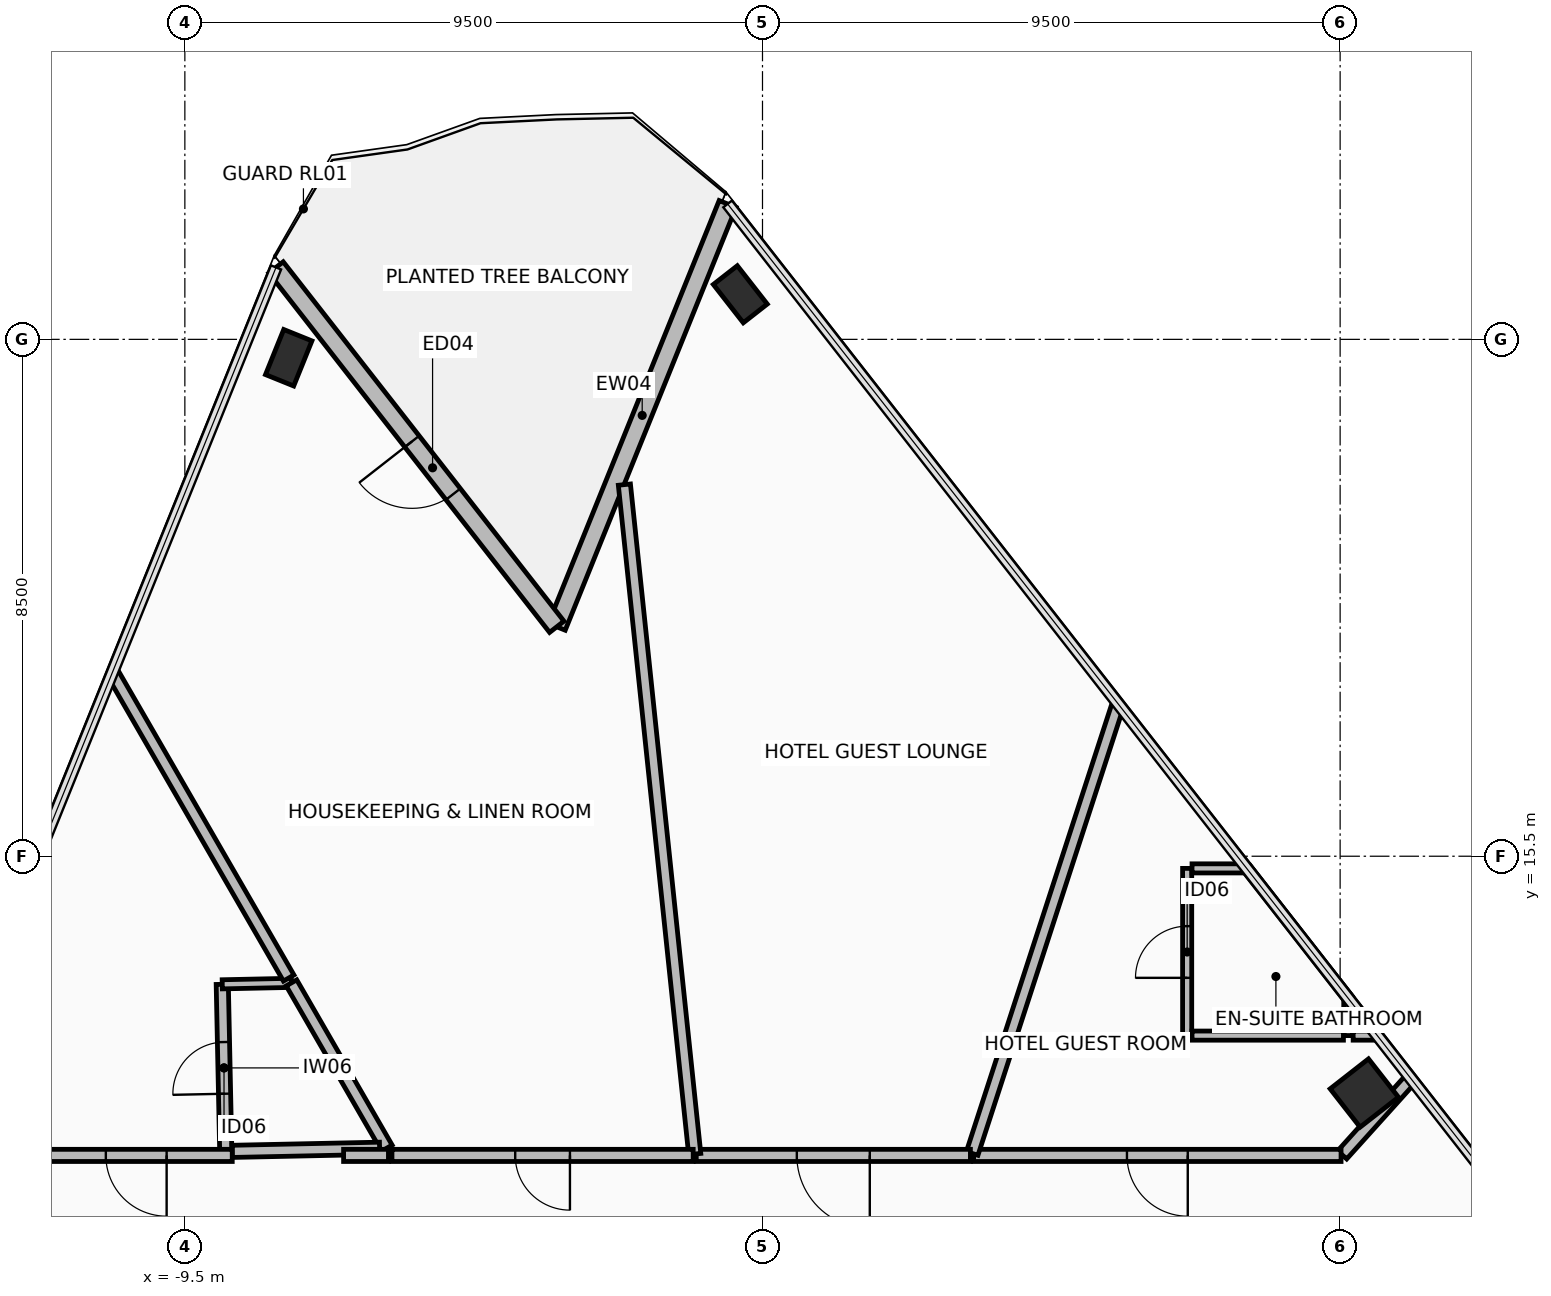
"""IFC4 building model, lengths in metres.
Left out: names, types, materials, properties, quantities, classifications, styles, units other than length and angle.
Written with IfcOpenShell. Run it as: python <this file> out.ifc"""

import sys

from ifc_helpers import new_model, si_unit, direction, frame, frame_2d, origin, origin_2d, place, context, subcontext, project, spatial, rectangle, hollow_rectangle, extrude, element, fill, save


model = new_model("IFC4")
c1 = context("Model", 3, precision=1e-05, world=origin(), true_north=direction((0.0, 1.0)))
c2 = subcontext(c1, "Body", "Model", "MODEL_VIEW")
j1 = project(units=[si_unit("LENGTHUNIT", "METRE"), si_unit("PLANEANGLEUNIT", "RADIAN")], contexts=[c1])
p1 = place(None, origin())
s1 = spatial("IfcSite", under=j1, at=p1, CompositionType="ELEMENT")
p2 = place(p1, origin())
s2 = spatial("IfcBuilding", under=s1, at=p2, CompositionType="ELEMENT")
p3 = place(p2, frame((0.0, 0.0, 63.85)))
s3 = spatial("IfcBuildingStorey", under=s2, at=p3, CompositionType="ELEMENT", Elevation=63.85)
p4 = place(p3, frame((-7.792, 23.698, 0.0), z_axis=(0.0, 0.0, 1.0), x_axis=(0.374608211656, 0.927183200754, 0.0)))
e1 = element("IfcColumn", 1, at=p4, inside=s3, PredefinedType="COLUMN", context=c2, shape_type="SweptSolid", body=[
    extrude(hollow_rectangle(XDim=0.5, YDim=0.8, WallThickness=0.04, at=origin_2d()), origin(), (0.0, 0.0, 1.0), 3.45),
])
p5 = place(p3, frame((9.898, 11.606, 0.0), z_axis=(0.0, 0.0, 1.0), x_axis=(-0.615661475326, 0.788010753607, 0.0)))
e2 = element("IfcColumn", 2, at=p5, inside=s3, PredefinedType="COLUMN", context=c2, shape_type="SweptSolid", body=[
    extrude(hollow_rectangle(XDim=0.8, YDim=0.8, WallThickness=0.045, at=origin_2d()), origin(), (0.0, 0.0, 1.0), 3.45),
])
p6 = place(p3, frame((-0.365, 24.741, 0.0), z_axis=(0.0, 0.0, 1.0), x_axis=(-0.615661475326, 0.788010753607, 0.0)))
e3 = element("IfcColumn", 3, at=p6, inside=s3, PredefinedType="COLUMN", context=c2, shape_type="SweptSolid", body=[
    extrude(hollow_rectangle(XDim=0.5, YDim=0.8, WallThickness=0.04, at=origin_2d()), origin(), (0.0, 0.0, 1.0), 3.45),
])
p7 = place(p3, frame((-0.574, 26.227, 0.0), z_axis=(0.0, 0.0, 1.0), x_axis=(-0.374609979755, -0.92718248639, 0.0)))
e4 = element("IfcWall", 4, at=p7, inside=s3, PredefinedType="STANDARD", context=c2, shape_type="SweptSolid", body=[
    extrude(rectangle(XDim=7.5, YDim=0.3, at=frame_2d((3.75, 0.0))), origin(), (0.0, 0.0, 1.0), 2.47),
])
p8 = place(p3, frame((-3.383, 19.273, 0.0), z_axis=(0.0, 0.0, 1.0), x_axis=(-0.615654149001, 0.788016477504, 0.0)))
e5 = element("IfcWall", 5, at=p8, inside=s3, PredefinedType="STANDARD", context=c2, shape_type="SweptSolid", body=[
    extrude(rectangle(XDim=7.5, YDim=0.3, at=frame_2d((3.75, 0.0))), origin(), (0.0, 0.0, 1.0), 2.47),
])
p9 = place(p8, frame((2.768, 0.0, 0.0)))
e6 = element("IfcOpeningElement", 6, at=p9, cuts=e5, PredefinedType="OPENING", context=c2, shape_type="SweptSolid", body=[
    extrude(rectangle(XDim=1.1, YDim=2.2, at=frame_2d((0.55, 1.1))), frame((0.0, 0.16, 0.0), z_axis=(0.0, -1.0, 0.0), x_axis=(1.0, 0.0, 0.0)), (0.0, 0.0, 1.0), 0.32),
])
p10 = place(p3, frame((6.984, 12.55, 0.0), z_axis=(0.0, 0.0, 1.0), x_axis=(0.0, 1.0, 0.0)))
e7 = element("IfcWall", 7, at=p10, inside=s3, PredefinedType="PARTITIONING", context=c2, shape_type="SweptSolid", body=[
    extrude(rectangle(XDim=2.75, YDim=0.15, at=frame_2d((1.375, 0.0))), origin(), (0.0, 0.0, 1.0), 2.47),
])
p11 = place(p10, frame((0.95, 0.0, 0.0)))
e8 = element("IfcOpeningElement", 8, at=p11, cuts=e7, PredefinedType="OPENING", context=c2, shape_type="SweptSolid", body=[
    extrude(rectangle(XDim=0.85, YDim=2.1, at=frame_2d((0.425, 1.05))), frame((0.0, 0.085, 0.0), z_axis=(0.0, -1.0, 0.0), x_axis=(1.0, 0.0, 0.0)), (0.0, 0.0, 1.0), 0.17),
])
p12 = place(p3, frame((7.064, 15.3, 0.0), z_axis=(0.0, 0.0, 1.0), x_axis=(1.0, 0.0, 0.0)))
e9 = element("IfcWall", 9, at=p12, inside=s3, PredefinedType="PARTITIONING", context=c2, shape_type="SweptSolid", body=[
    extrude(rectangle(XDim=0.899, YDim=0.15, at=frame_2d((0.45, 0.0))), origin(), (0.0, 0.0, 1.0), 2.47),
])
p13 = place(p3, frame((7.963, 15.3, 0.0), z_axis=(0.0, 0.0, 1.0), x_axis=(0.615614367474, -0.788047556026, 0.0)))
e10 = element("IfcWall", 10, at=p13, inside=s3, PredefinedType="PARTITIONING", context=c2, shape_type="SweptSolid", body=[
    extrude(rectangle(XDim=2.714, YDim=0.15, at=frame_2d((1.357, 0.0))), origin(), (0.0, 0.0, 1.0), 3.275),
])
p14 = place(p3, frame((9.634, 13.161, 0.0), z_axis=(0.0, 0.0, 1.0), x_axis=(0.0, -1.0, 0.0)))
e11 = element("IfcWall", 11, at=p14, inside=s3, PredefinedType="PARTITIONING", context=c2, shape_type="SweptSolid", body=[
    extrude(rectangle(XDim=0.611, YDim=0.15, at=frame_2d((0.306, 0.0))), origin(), (0.0, 0.0, 1.0), 3.275),
])
p15 = place(p3, frame((10.112, 12.55, 0.0), z_axis=(0.0, 0.0, 1.0), x_axis=(-1.0, 0.0, 0.0)))
e12 = element("IfcWall", 12, at=p15, inside=s3, PredefinedType="PARTITIONING", context=c2, shape_type="SweptSolid", body=[
    extrude(rectangle(XDim=0.397, YDim=0.15, at=frame_2d((0.199, 0.0))), origin(), (0.0, 0.0, 1.0), 3.275),
])
p16 = place(p3, frame((9.554, 12.55, 0.0), z_axis=(0.0, 0.0, 1.0), x_axis=(-1.0, 0.0, 0.0)))
e13 = element("IfcWall", 13, at=p16, inside=s3, PredefinedType="PARTITIONING", context=c2, shape_type="SweptSolid", body=[
    extrude(rectangle(XDim=2.49, YDim=0.15, at=frame_2d((1.245, 0.0))), origin(), (0.0, 0.0, 1.0), 2.47),
])
p17 = place(p3, frame((-8.827, 10.644, 0.0), z_axis=(0.0, 0.0, 1.0), x_axis=(-0.021041428763, 0.99977860463, 0.0)))
e14 = element("IfcWall", 14, at=p17, inside=s3, PredefinedType="PARTITIONING", context=c2, shape_type="SweptSolid", body=[
    extrude(rectangle(XDim=2.75, YDim=0.2, at=frame_2d((1.375, 0.0))), origin(), (0.0, 0.0, 1.0), 2.67),
])
p18 = place(p17, frame((0.95, 0.0, 0.0)))
e15 = element("IfcOpeningElement", 15, at=p18, cuts=e14, PredefinedType="OPENING", context=c2, shape_type="SweptSolid", body=[
    extrude(rectangle(XDim=0.85, YDim=2.1, at=frame_2d((0.425, 1.05))), frame((0.0, 0.11, 0.0), z_axis=(0.0, -1.0, 0.0), x_axis=(1.0, 0.0, 0.0)), (0.0, 0.0, 1.0), 0.22),
])
p19 = place(p3, frame((-8.885, 13.394, 0.0), z_axis=(0.0, 0.0, 1.0), x_axis=(0.999779226224, 0.02101187308, 0.0)))
e16 = element("IfcWall", 16, at=p19, inside=s3, PredefinedType="PARTITIONING", context=c2, shape_type="SweptSolid", body=[
    extrude(rectangle(XDim=1.139, YDim=0.15, at=frame_2d((0.569, 0.0))), origin(), (0.0, 0.0, 1.0), 2.67),
])
p20 = place(p3, frame((-7.747, 13.417, 0.0), z_axis=(0.0, 0.0, 1.0), x_axis=(0.50003000113, -0.866008081931, 0.0)))
e17 = element("IfcWall", 17, at=p20, inside=s3, PredefinedType="PARTITIONING", context=c2, shape_type="SweptSolid", body=[
    extrude(rectangle(XDim=3.138, YDim=0.2, at=frame_2d((1.569, 0.0))), origin(), (0.0, 0.0, 1.0), 2.62),
])
p21 = place(p3, frame((-6.297, 10.698, 0.0), z_axis=(0.0, 0.0, 1.0), x_axis=(-0.999778667622, -0.021038435515, 0.0)))
e18 = element("IfcWall", 18, at=p21, inside=s3, PredefinedType="PARTITIONING", context=c2, shape_type="SweptSolid", body=[
    extrude(rectangle(XDim=2.425, YDim=0.2, at=frame_2d((1.213, 0.0))), origin(), (0.0, 0.0, 1.0), 2.62),
])
p22 = place(p3, frame((10.65, 11.828, 0.0), z_axis=(0.0, 0.0, 1.0), x_axis=(-0.669183038029, -0.74309761244, 0.0)))
e19 = element("IfcWall", 19, at=p22, inside=s3, PredefinedType="PARTITIONING", context=c2, shape_type="SweptSolid", body=[
    extrude(rectangle(XDim=1.668, YDim=0.2, at=frame_2d((0.834, 0.0))), origin(), (0.0, 0.0, 1.0), 2.47),
])
p23 = place(p3, frame((9.515, 10.58, 0.0), z_axis=(0.0, 0.0, 1.0), x_axis=(-1.0, 0.0, 0.0)))
e20 = element("IfcWall", 20, at=p23, inside=s3, PredefinedType="PARTITIONING", context=c2, shape_type="SweptSolid", body=[
    extrude(rectangle(XDim=6.043, YDim=0.2, at=frame_2d((3.021, 0.0))), origin(), (0.0, 0.0, 1.0), 2.67),
])
p24 = place(p23, frame((2.521, 0.0, 0.0)))
e21 = element("IfcOpeningElement", 21, at=p24, cuts=e20, PredefinedType="OPENING", context=c2, shape_type="SweptSolid", body=[
    extrude(rectangle(XDim=1.0, YDim=2.15, at=frame_2d((0.5, 1.075))), frame((0.0, 0.11, 0.0), z_axis=(0.0, -1.0, 0.0), x_axis=(1.0, 0.0, 0.0)), (0.0, 0.0, 1.0), 0.22),
])
p25 = place(p3, frame((3.448, 10.613, 0.0), z_axis=(0.0, 0.0, 1.0), x_axis=(0.30901930812, 0.951055764511, 0.0)))
e22 = element("IfcWall", 22, at=p25, inside=s3, PredefinedType="PARTITIONING", context=c2, shape_type="SweptSolid", body=[
    extrude(rectangle(XDim=7.772, YDim=0.2, at=frame_2d((3.886, 0.0))), origin(), (0.0, 0.0, 1.0), 2.47),
])
p26 = place(p3, frame((3.419, 10.58, 0.0), z_axis=(0.0, 0.0, 1.0), x_axis=(-1.0, 0.0, 0.0)))
e23 = element("IfcWall", 23, at=p26, inside=s3, PredefinedType="PARTITIONING", context=c2, shape_type="SweptSolid", body=[
    extrude(rectangle(XDim=4.509, YDim=0.2, at=frame_2d((2.254, 0.0))), origin(), (0.0, 0.0, 1.0), 2.67),
])
p27 = place(p26, frame((1.655, 0.0, 0.0)))
e24 = element("IfcOpeningElement", 24, at=p27, cuts=e23, PredefinedType="OPENING", context=c2, shape_type="SweptSolid", body=[
    extrude(rectangle(XDim=1.2, YDim=2.15, at=frame_2d((0.6, 1.075))), frame((0.0, 0.11, 0.0), z_axis=(0.0, -1.0, 0.0), x_axis=(1.0, 0.0, 0.0)), (0.0, 0.0, 1.0), 0.22),
])
p28 = place(p3, frame((-1.115, 10.602, 0.0), z_axis=(0.0, 0.0, 1.0), x_axis=(-0.104520606216, 0.994522721146, 0.0)))
e25 = element("IfcWall", 25, at=p28, inside=s3, PredefinedType="PARTITIONING", context=c2, shape_type="SweptSolid", body=[
    extrude(rectangle(XDim=11.069, YDim=0.2, at=frame_2d((5.535, 0.0))), origin(), (0.0, 0.0, 1.0), 3.275),
])
p29 = place(p3, frame((-1.14, 10.58, 0.0), z_axis=(0.0, 0.0, 1.0), x_axis=(-1.0, 0.0, 0.0)))
e26 = element("IfcWall", 26, at=p29, inside=s3, PredefinedType="PARTITIONING", context=c2, shape_type="SweptSolid", body=[
    extrude(rectangle(XDim=4.954, YDim=0.2, at=frame_2d((2.477, 0.0))), origin(), (0.0, 0.0, 1.0), 3.275),
])
p30 = place(p29, frame((2.027, 0.0, 0.0)))
e27 = element("IfcOpeningElement", 27, at=p30, cuts=e26, PredefinedType="OPENING", context=c2, shape_type="SweptSolid", body=[
    extrude(rectangle(XDim=0.9, YDim=2.1, at=frame_2d((0.45, 1.05))), frame((0.0, 0.11, 0.0), z_axis=(0.0, -1.0, 0.0), x_axis=(1.0, 0.0, 0.0)), (0.0, 0.0, 1.0), 0.22),
])
p31 = place(p3, frame((-7.792, 13.497, 0.0), z_axis=(0.0, 0.0, 1.0), x_axis=(-0.499990180648, 0.866031072916, 0.0)))
e28 = element("IfcWall", 28, at=p31, inside=s3, PredefinedType="PARTITIONING", context=c2, shape_type="SweptSolid", body=[
    extrude(rectangle(XDim=5.789, YDim=0.2, at=frame_2d((2.894, 0.0))), origin(), (0.0, 0.0, 1.0), 2.47),
])
p32 = place(p3, frame((-6.152, 10.58, 0.0), z_axis=(0.0, 0.0, 1.0), x_axis=(-1.0, 0.0, 0.0)))
e29 = element("IfcWall", 29, at=p32, inside=s3, PredefinedType="PARTITIONING", context=c2, shape_type="SweptSolid", body=[
    extrude(rectangle(XDim=0.738, YDim=0.2, at=frame_2d((0.369, 0.0))), origin(), (0.0, 0.0, 1.0), 3.275),
])
p33 = place(p3, frame((-8.721, 10.58, 0.0), z_axis=(0.0, 0.0, 1.0), x_axis=(-1.0, 0.0, 0.0)))
e30 = element("IfcWall", 30, at=p33, inside=s3, PredefinedType="PARTITIONING", context=c2, shape_type="SweptSolid", body=[
    extrude(rectangle(XDim=3.159, YDim=0.2, at=frame_2d((1.579, 0.0))), origin(), (0.0, 0.0, 1.0), 2.67),
])
p34 = place(p33, frame((1.079, 0.0, 0.0)))
e31 = element("IfcOpeningElement", 31, at=p34, cuts=e30, PredefinedType="OPENING", context=c2, shape_type="SweptSolid", body=[
    extrude(rectangle(XDim=1.0, YDim=2.15, at=frame_2d((0.5, 1.075))), frame((0.0, 0.11, 0.0), z_axis=(0.0, -1.0, 0.0), x_axis=(1.0, 0.0, 0.0)), (0.0, 0.0, 1.0), 0.22),
])
p35 = place(p9, frame((1.1, 0.0, 0.0), z_axis=(0.0, 0.0, 1.0), x_axis=(-1.0, 0.0, 0.0)))
e32 = element("IfcDoor", 32, at=p35, inside=s3, OperationType="SINGLE_SWING_LEFT", PredefinedType="DOOR", context=c2, shape_type="SweptSolid", body=[
    extrude(rectangle(XDim=1.1, YDim=2.2, at=frame_2d((0.55, 1.1))), frame((0.0, 0.025, 0.0), z_axis=(0.0, -1.0, 0.0), x_axis=(1.0, 0.0, 0.0)), (0.0, 0.0, 1.0), 0.05),
])
fill(e6, e32)
p36 = place(p11, origin())
e33 = element("IfcDoor", 33, at=p36, inside=s3, OperationType="SINGLE_SWING_RIGHT", PredefinedType="DOOR", context=c2, shape_type="SweptSolid", body=[
    extrude(rectangle(XDim=0.85, YDim=2.1, at=frame_2d((0.425, 1.05))), frame((0.0, 0.025, 0.0), z_axis=(0.0, -1.0, 0.0), x_axis=(1.0, 0.0, 0.0)), (0.0, 0.0, 1.0), 0.05),
])
fill(e8, e33)
p37 = place(p18, origin())
e34 = element("IfcDoor", 34, at=p37, inside=s3, OperationType="SINGLE_SWING_RIGHT", PredefinedType="DOOR", context=c2, shape_type="SweptSolid", body=[
    extrude(rectangle(XDim=0.85, YDim=2.1, at=frame_2d((0.425, 1.05))), frame((0.0, 0.025, 0.0), z_axis=(0.0, -1.0, 0.0), x_axis=(1.0, 0.0, 0.0)), (0.0, 0.0, 1.0), 0.05),
])
fill(e15, e34)
p38 = place(p24, origin())
e35 = element("IfcDoor", 35, at=p38, inside=s3, OperationType="SINGLE_SWING_LEFT", PredefinedType="DOOR", context=c2, shape_type="SweptSolid", body=[
    extrude(rectangle(XDim=1.0, YDim=2.15, at=frame_2d((0.5, 1.075))), frame((0.0, 0.025, 0.0), z_axis=(0.0, -1.0, 0.0), x_axis=(1.0, 0.0, 0.0)), (0.0, 0.0, 1.0), 0.05),
])
fill(e21, e35)
p39 = place(p27, origin())
e36 = element("IfcDoor", 36, at=p39, inside=s3, OperationType="SINGLE_SWING_LEFT", PredefinedType="DOOR", context=c2, shape_type="SweptSolid", body=[
    extrude(rectangle(XDim=1.2, YDim=2.15, at=frame_2d((0.6, 1.075))), frame((0.0, 0.025, 0.0), z_axis=(0.0, -1.0, 0.0), x_axis=(1.0, 0.0, 0.0)), (0.0, 0.0, 1.0), 0.05),
])
fill(e24, e36)
p40 = place(p30, origin())
e37 = element("IfcDoor", 37, at=p40, inside=s3, OperationType="SINGLE_SWING_LEFT", PredefinedType="DOOR", context=c2, shape_type="SweptSolid", body=[
    extrude(rectangle(XDim=0.9, YDim=2.1, at=frame_2d((0.45, 1.05))), frame((0.0, 0.025, 0.0), z_axis=(0.0, -1.0, 0.0), x_axis=(1.0, 0.0, 0.0)), (0.0, 0.0, 1.0), 0.05),
])
fill(e27, e37)
p41 = place(p34, origin())
e38 = element("IfcDoor", 38, at=p41, inside=s3, OperationType="SINGLE_SWING_LEFT", PredefinedType="DOOR", context=c2, shape_type="SweptSolid", body=[
    extrude(rectangle(XDim=1.0, YDim=2.15, at=frame_2d((0.5, 1.075))), frame((0.0, 0.025, 0.0), z_axis=(0.0, -1.0, 0.0), x_axis=(1.0, 0.0, 0.0)), (0.0, 0.0, 1.0), 0.05),
])
fill(e31, e38)
save(model, sys.argv[1])
